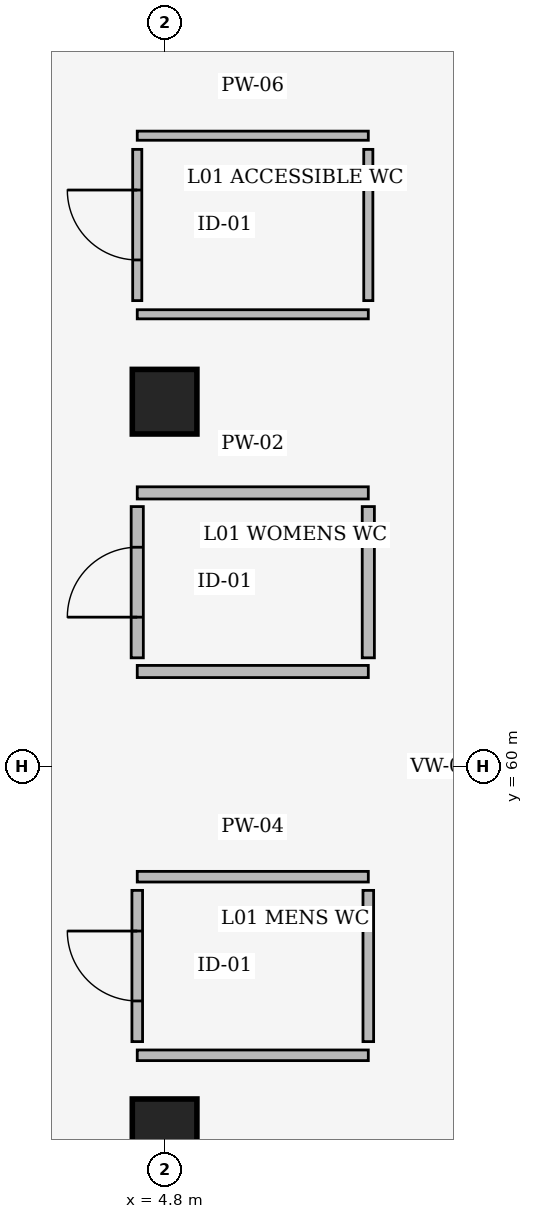
"""IFC4 building model, lengths in metres.
Left out: names, types, materials, properties, quantities, classifications, styles, units other than length and angle.
Written with IfcOpenShell. Run it as: python <this file> out.ifc"""

import sys

from ifc_helpers import new_model, si_unit, direction, frame, frame_2d, origin, origin_2d, place, context, subcontext, project, spatial, rectangle, extrude, element, fill, save


model = new_model("IFC4")
c1 = context("Model", 3, precision=1e-05, world=origin(), true_north=direction((0.0, 1.0)))
c2 = subcontext(c1, "Body", "Model", "MODEL_VIEW")
j1 = project(units=[si_unit("LENGTHUNIT", "METRE"), si_unit("PLANEANGLEUNIT", "RADIAN")], contexts=[c1])
p1 = place(None, origin())
s1 = spatial("IfcSite", under=j1, at=p1, CompositionType="ELEMENT")
p2 = place(p1, origin())
s2 = spatial("IfcBuilding", under=s1, at=p2, CompositionType="ELEMENT")
p3 = place(p2, frame((0.0, 0.0, 5.4)))
s3 = spatial("IfcBuildingStorey", under=s2, at=p3, CompositionType="ELEMENT", Elevation=5.4)
for number, where, z_axis, x_axis in (
    (1, (4.8, 55.2, 0.0), (0.0, 0.0, 1.0), (1.0, 0.0, 0.0)),
    (2, (4.8, 64.8, 0.0), (0.0, 0.0, 1.0), (1.0, 0.0, 0.0)),
):
    element("IfcColumn", number, at=place(p3, frame(where, z_axis=z_axis, x_axis=x_axis)), inside=s3, PredefinedType="COLUMN", context=c2, shape_type="SweptSolid", body=[
        extrude(rectangle(XDim=0.85, YDim=0.85, at=origin_2d()), origin(), (0.0, 0.0, 1.0), 5.1),
    ])
for number, where, z_axis, x_axis in (
    (3, (4.44, 58.55, 0.0), (0.0, 0.0, 1.0), (1.0, 0.0, 0.0)),
    (4, (4.44, 56.2, 0.0), (0.0, 0.0, 1.0), (1.0, 0.0, 0.0)),
):
    element("IfcWall", number, at=place(p3, frame(where, z_axis=z_axis, x_axis=x_axis)), inside=s3, PredefinedType="PARTITIONING", context=c2, shape_type="SweptSolid", body=[
        extrude(rectangle(XDim=3.04, YDim=0.14, at=frame_2d((1.52, 0.0))), origin(), (0.0, 0.0, 1.0), 4.055),
    ])
p4 = place(p3, frame((4.44, 56.38, 0.0), z_axis=(0.0, 0.0, 1.0), x_axis=(0.0, 1.0, 0.0)))
e5 = element("IfcWall", 5, at=p4, inside=s3, PredefinedType="PARTITIONING", context=c2, shape_type="SweptSolid", body=[
    extrude(rectangle(XDim=1.99, YDim=0.14, at=frame_2d((0.995, 0.0))), origin(), (0.0, 0.0, 1.0), 4.055),
])
p5 = place(p4, frame((0.535, 0.0, 0.0)))
e6 = element("IfcOpeningElement", 6, at=p5, cuts=e5, PredefinedType="OPENING", context=c2, shape_type="SweptSolid", body=[
    extrude(rectangle(XDim=0.92, YDim=2.12, at=frame_2d((0.46, 1.06))), frame((0.0, 0.08, 0.0), z_axis=(0.0, -1.0, 0.0), x_axis=(1.0, 0.0, 0.0)), (0.0, 0.0, 1.0), 0.16),
])
p6 = place(p3, frame((7.48, 56.38, 0.0), z_axis=(0.0, 0.0, 1.0), x_axis=(0.0, 1.0, 0.0)))
e7 = element("IfcWall", 7, at=p6, inside=s3, PredefinedType="PARTITIONING", context=c2, shape_type="SweptSolid", body=[
    extrude(rectangle(XDim=1.99, YDim=0.14, at=frame_2d((0.995, 0.0))), origin(), (0.0, 0.0, 1.0), 4.74),
])
for number, where, z_axis, x_axis in (
    (8, (4.44, 63.6, 0.0), (0.0, 0.0, 1.0), (1.0, 0.0, 0.0)),
    (9, (4.44, 61.25, 0.0), (0.0, 0.0, 1.0), (1.0, 0.0, 0.0)),
):
    element("IfcWall", number, at=place(p3, frame(where, z_axis=z_axis, x_axis=x_axis)), inside=s3, PredefinedType="PARTITIONING", context=c2, shape_type="SweptSolid", body=[
        extrude(rectangle(XDim=3.04, YDim=0.16, at=frame_2d((1.52, 0.0))), origin(), (0.0, 0.0, 1.0), 4.055),
    ])
p7 = place(p3, frame((4.44, 61.43, 0.0), z_axis=(0.0, 0.0, 1.0), x_axis=(0.0, 1.0, 0.0)))
e10 = element("IfcWall", 10, at=p7, inside=s3, PredefinedType="PARTITIONING", context=c2, shape_type="SweptSolid", body=[
    extrude(rectangle(XDim=1.99, YDim=0.16, at=frame_2d((0.995, 0.0))), origin(), (0.0, 0.0, 1.0), 4.055),
])
p8 = place(p7, frame((0.535, 0.0, 0.0)))
e11 = element("IfcOpeningElement", 11, at=p8, cuts=e10, PredefinedType="OPENING", context=c2, shape_type="SweptSolid", body=[
    extrude(rectangle(XDim=0.92, YDim=2.12, at=frame_2d((0.46, 1.06))), frame((0.0, 0.09, 0.0), z_axis=(0.0, -1.0, 0.0), x_axis=(1.0, 0.0, 0.0)), (0.0, 0.0, 1.0), 0.18),
])
p9 = place(p3, frame((7.48, 61.43, 0.0), z_axis=(0.0, 0.0, 1.0), x_axis=(0.0, 1.0, 0.0)))
e12 = element("IfcWall", 12, at=p9, inside=s3, PredefinedType="PARTITIONING", context=c2, shape_type="SweptSolid", body=[
    extrude(rectangle(XDim=1.99, YDim=0.16, at=frame_2d((0.995, 0.0))), origin(), (0.0, 0.0, 1.0), 4.74),
])
for number, where, z_axis, x_axis in (
    (13, (4.44, 68.3, 0.0), (0.0, 0.0, 1.0), (1.0, 0.0, 0.0)),
    (14, (4.44, 65.95, 0.0), (0.0, 0.0, 1.0), (1.0, 0.0, 0.0)),
):
    element("IfcWall", number, at=place(p3, frame(where, z_axis=z_axis, x_axis=x_axis)), inside=s3, PredefinedType="PARTITIONING", context=c2, shape_type="SweptSolid", body=[
        extrude(rectangle(XDim=3.04, YDim=0.12, at=frame_2d((1.52, 0.0))), origin(), (0.0, 0.0, 1.0), 4.122),
    ])
p10 = place(p3, frame((4.44, 66.13, 0.0), z_axis=(0.0, 0.0, 1.0), x_axis=(0.0, 1.0, 0.0)))
e15 = element("IfcWall", 15, at=p10, inside=s3, PredefinedType="PARTITIONING", context=c2, shape_type="SweptSolid", body=[
    extrude(rectangle(XDim=1.99, YDim=0.12, at=frame_2d((0.995, 0.0))), origin(), (0.0, 0.0, 1.0), 4.122),
])
p11 = place(p10, frame((0.535, 0.0, 0.0)))
e16 = element("IfcOpeningElement", 16, at=p11, cuts=e15, PredefinedType="OPENING", context=c2, shape_type="SweptSolid", body=[
    extrude(rectangle(XDim=0.92, YDim=2.12, at=frame_2d((0.46, 1.06))), frame((0.0, 0.07, 0.0), z_axis=(0.0, -1.0, 0.0), x_axis=(1.0, 0.0, 0.0)), (0.0, 0.0, 1.0), 0.14),
])
p12 = place(p3, frame((7.48, 66.13, 0.0), z_axis=(0.0, 0.0, 1.0), x_axis=(0.0, 1.0, 0.0)))
e17 = element("IfcWall", 17, at=p12, inside=s3, PredefinedType="PARTITIONING", context=c2, shape_type="SweptSolid", body=[
    extrude(rectangle(XDim=1.99, YDim=0.12, at=frame_2d((0.995, 0.0))), origin(), (0.0, 0.0, 1.0), 4.74),
])
p13 = place(p5, origin())
e18 = element("IfcDoor", 18, at=p13, inside=s3, OperationType="SINGLE_SWING_RIGHT", PredefinedType="DOOR", context=c2, shape_type="SweptSolid", body=[
    extrude(rectangle(XDim=0.92, YDim=2.12, at=frame_2d((0.46, 1.06))), frame((0.0, 0.025, 0.0), z_axis=(0.0, -1.0, 0.0), x_axis=(1.0, 0.0, 0.0)), (0.0, 0.0, 1.0), 0.05),
])
fill(e6, e18)
p14 = place(p8, origin())
e19 = element("IfcDoor", 19, at=p14, inside=s3, OperationType="SINGLE_SWING_LEFT", PredefinedType="DOOR", context=c2, shape_type="SweptSolid", body=[
    extrude(rectangle(XDim=0.92, YDim=2.12, at=frame_2d((0.46, 1.06))), frame((0.0, 0.025, 0.0), z_axis=(0.0, -1.0, 0.0), x_axis=(1.0, 0.0, 0.0)), (0.0, 0.0, 1.0), 0.05),
])
fill(e11, e19)
p15 = place(p11, origin())
e20 = element("IfcDoor", 20, at=p15, inside=s3, OperationType="SINGLE_SWING_RIGHT", PredefinedType="DOOR", context=c2, shape_type="SweptSolid", body=[
    extrude(rectangle(XDim=0.92, YDim=2.12, at=frame_2d((0.46, 1.06))), frame((0.0, 0.025, 0.0), z_axis=(0.0, -1.0, 0.0), x_axis=(1.0, 0.0, 0.0)), (0.0, 0.0, 1.0), 0.05),
])
fill(e16, e20)
save(model, sys.argv[1])
